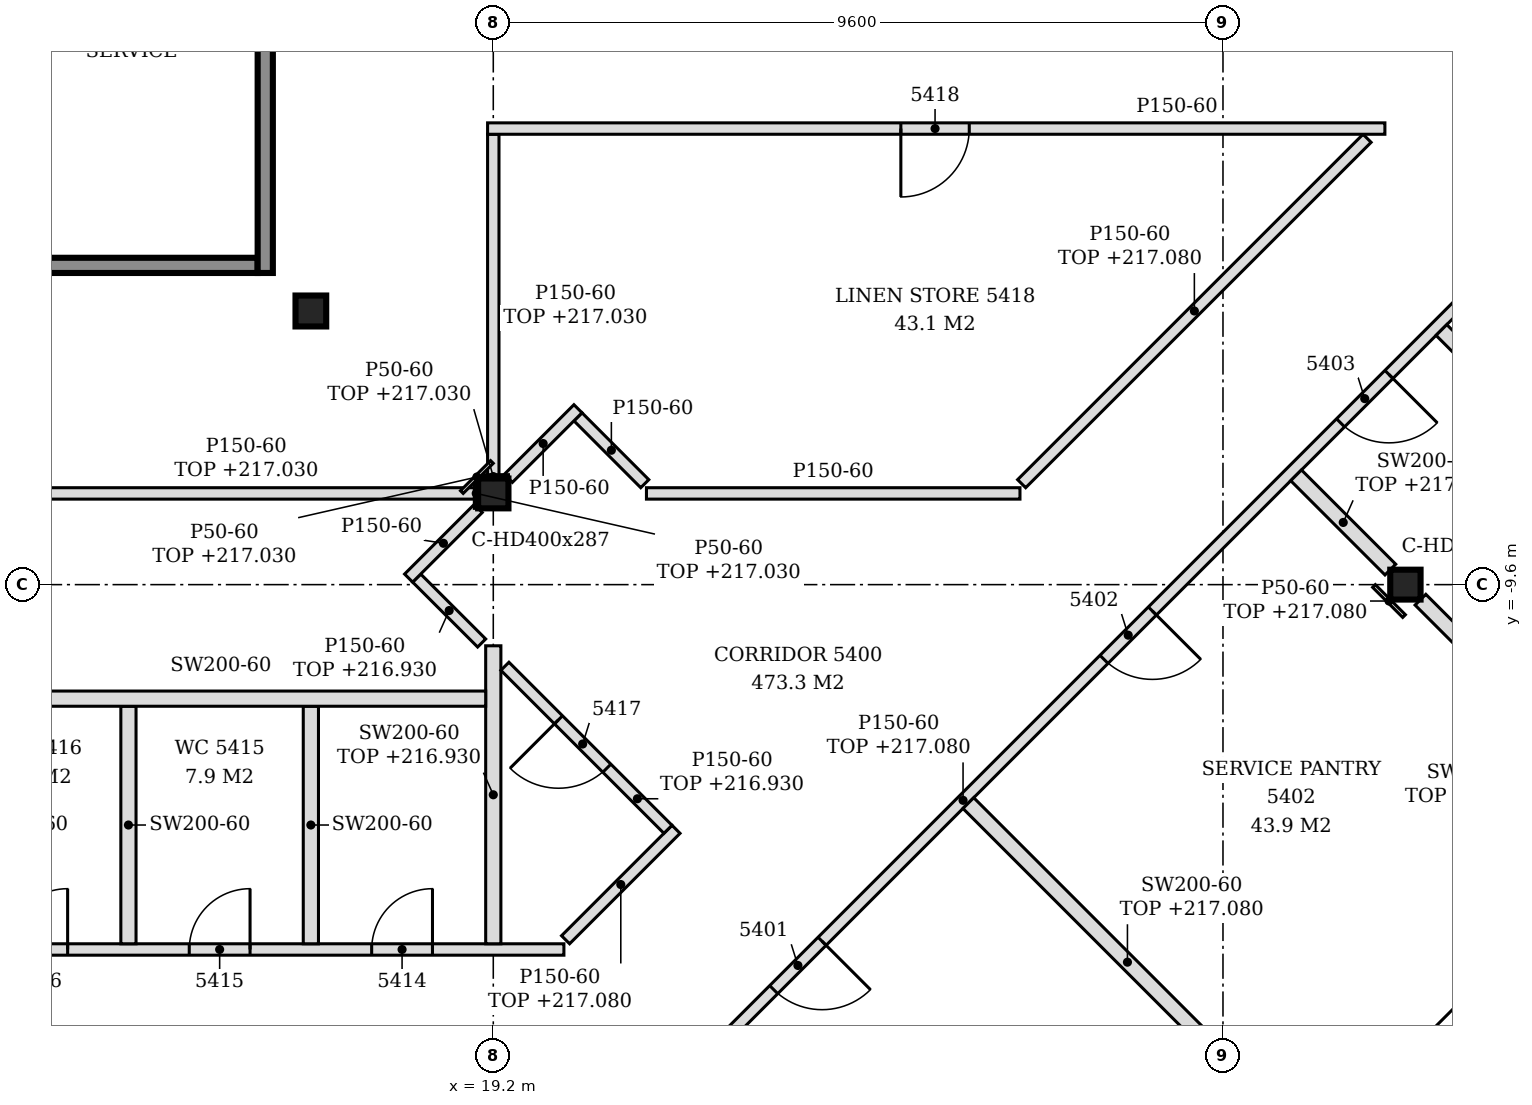
"""IFC4 building model, lengths in metres.
Left out: names, types, materials, properties, quantities, classifications, styles, units other than length and angle.
Written with IfcOpenShell. Run it as: python <this file> out.ifc"""

import sys

from ifc_helpers import new_model, si_unit, direction, frame, frame_2d, origin, origin_2d, place, context, subcontext, project, spatial, polyline, rectangle, i_section, outline, extrude, element, fill, save


model = new_model("IFC4")
c1 = context("Model", 3, precision=1e-05, world=origin(), true_north=direction((0.0, 1.0)))
c2 = subcontext(c1, "Body", "Model", "MODEL_VIEW")
j1 = project(units=[si_unit("LENGTHUNIT", "METRE"), si_unit("PLANEANGLEUNIT", "RADIAN")], contexts=[c1])
p1 = place(None, origin())
s1 = spatial("IfcSite", under=j1, at=p1, CompositionType="ELEMENT")
p2 = place(p1, origin())
s2 = spatial("IfcBuilding", under=s1, at=p2, CompositionType="ELEMENT")
p3 = place(p2, frame((0.0, 0.0, 214.2)))
s3 = spatial("IfcBuildingStorey", under=s2, at=p3, CompositionType="ELEMENT", Elevation=214.2)
p4 = place(p3, frame((19.2, -8.4, -0.15), z_axis=(0.0, 0.0, 1.0), x_axis=(1.0, 0.0, 0.0)))
e1 = element("IfcColumn", 1, at=p4, inside=s3, PredefinedType="COLUMN", context=c2, shape_type="SweptSolid", body=[
    extrude(i_section(OverallWidth=0.399, OverallDepth=0.393, WebThickness=0.023, FlangeThickness=0.037, FilletRadius=0.015, at=origin_2d()), origin(), (0.0, 0.0, 1.0), 3.6),
])
p5 = place(p3, frame((16.8, -6.0, -0.15), z_axis=(0.0, 0.0, 1.0), x_axis=(1.0, 0.0, 0.0)))
e2 = element("IfcColumn", 2, at=p5, inside=s3, PredefinedType="COLUMN", context=c2, shape_type="SweptSolid", body=[
    extrude(i_section(OverallWidth=0.404, OverallDepth=0.407, WebThickness=0.027, FlangeThickness=0.044, FilletRadius=0.015, at=origin_2d()), origin(), (0.0, 0.0, 1.0), 3.6),
])
p6 = place(p3, frame((31.2, -9.6, -0.15), z_axis=(0.0, 0.0, 1.0), x_axis=(1.0, 0.0, 0.0)))
e3 = element("IfcColumn", 3, at=p6, inside=s3, PredefinedType="COLUMN", context=c2, shape_type="SweptSolid", body=[
    extrude(i_section(OverallWidth=0.399, OverallDepth=0.393, WebThickness=0.023, FlangeThickness=0.037, FilletRadius=0.015, at=origin_2d()), origin(), (0.0, 0.0, 1.0), 3.6),
])
p7 = place(p3, frame((12.7, -5.4, 0.0), z_axis=(0.0, 0.0, 1.0), x_axis=(1.0, 0.0, 0.0)))
e4 = element("IfcWall", 4, at=p7, inside=s3, PredefinedType="SOLIDWALL", context=c2, shape_type="SweptSolid", body=[
    extrude(rectangle(XDim=3.4, YDim=0.2, at=frame_2d((1.7, 0.0))), origin(), (0.0, 0.0, 1.0), 3.45),
])
p8 = place(p3, frame((16.2, -5.5, 0.0), z_axis=(0.0, 0.0, 1.0), x_axis=(0.0, 1.0, 0.0)))
e5 = element("IfcWall", 5, at=p8, inside=s3, PredefinedType="SOLIDWALL", context=c2, shape_type="SweptSolid", body=[
    extrude(rectangle(XDim=15.8, YDim=0.2, at=frame_2d((7.9, 0.0))), origin(), (0.0, 0.0, 1.0), 3.45),
])
p9 = place(p8, frame((3.05, 0.0, 0.0)))
e6 = element("IfcOpeningElement", 6, at=p9, cuts=e5, PredefinedType="OPENING", context=c2, shape_type="SweptSolid", body=[
    extrude(rectangle(XDim=1.3, YDim=2.1, at=frame_2d((0.65, 1.05))), frame((0.0, 0.11, 0.0), z_axis=(0.0, -1.0, 0.0), x_axis=(1.0, 0.0, 0.0)), (0.0, 0.0, 1.0), 0.22),
])
p10 = place(p8, frame((11.45, 0.0, 0.0)))
e7 = element("IfcOpeningElement", 7, at=p10, cuts=e5, PredefinedType="OPENING", context=c2, shape_type="SweptSolid", body=[
    extrude(rectangle(XDim=1.3, YDim=2.1, at=frame_2d((0.65, 1.05))), frame((0.0, 0.11, 0.0), z_axis=(0.0, -1.0, 0.0), x_axis=(1.0, 0.0, 0.0)), (0.0, 0.0, 1.0), 0.22),
])
p11 = place(p3, frame((21.146, -16.672, 0.0), z_axis=(0.0, 0.0, 1.0), x_axis=(0.707100999376, 0.70711256295, 0.0)))
e8 = element("IfcWall", 8, at=p11, inside=s3, PredefinedType="PARTITIONING", context=c2, shape_type="SweptSolid", body=[
    extrude(rectangle(XDim=21.113, YDim=0.15, at=frame_2d((10.556, 0.0))), origin(), (0.0, 0.0, 1.0), 2.88),
])
p12 = place(p11, frame((2.466, 0.0, 0.0)))
e9 = element("IfcOpeningElement", 9, at=p12, cuts=e8, PredefinedType="OPENING", context=c2, shape_type="SweptSolid", body=[
    extrude(rectangle(XDim=0.9, YDim=2.1, at=frame_2d((0.45, 1.05))), frame((0.0, 0.085, 0.0), z_axis=(0.0, -1.0, 0.0), x_axis=(1.0, 0.0, 0.0)), (0.0, 0.0, 1.0), 0.17),
])
p13 = place(p11, frame((8.611, 0.0, 0.0)))
e10 = element("IfcOpeningElement", 10, at=p13, cuts=e8, PredefinedType="OPENING", context=c2, shape_type="SweptSolid", body=[
    extrude(rectangle(XDim=0.9, YDim=2.1, at=frame_2d((0.45, 1.05))), frame((0.0, 0.085, 0.0), z_axis=(0.0, -1.0, 0.0), x_axis=(1.0, 0.0, 0.0)), (0.0, 0.0, 1.0), 0.17),
])
p14 = place(p11, frame((13.012, 0.0, 0.0)))
e11 = element("IfcOpeningElement", 11, at=p14, cuts=e8, PredefinedType="OPENING", context=c2, shape_type="SweptSolid", body=[
    extrude(rectangle(XDim=0.9, YDim=2.1, at=frame_2d((0.45, 1.05))), frame((0.0, 0.085, 0.0), z_axis=(0.0, -1.0, 0.0), x_axis=(1.0, 0.0, 0.0)), (0.0, 0.0, 1.0), 0.17),
])
p15 = place(p11, frame((16.261, 0.0, 0.0)))
e12 = element("IfcOpeningElement", 12, at=p15, cuts=e8, PredefinedType="OPENING", context=c2, shape_type="SweptSolid", body=[
    extrude(rectangle(XDim=0.9, YDim=2.1, at=frame_2d((0.45, 1.05))), frame((0.0, 0.085, 0.0), z_axis=(0.0, -1.0, 0.0), x_axis=(1.0, 0.0, 0.0)), (0.0, 0.0, 1.0), 0.17),
])
p16 = place(p3, frame((29.636, -16.66, 0.0), z_axis=(0.0, 0.0, 1.0), x_axis=(-0.707106781187, 0.707106781187, 0.0)))
e13 = element("IfcWall", 13, at=p16, inside=s3, PredefinedType="PARTITIONING", context=c2, shape_type="SweptSolid", body=[
    extrude(rectangle(XDim=5.92, YDim=0.2, at=frame_2d((2.96, 0.0))), origin(), (0.0, 0.0, 1.0), 2.88),
])
p17 = place(p3, frame((2.325, -14.4, 0.0), z_axis=(0.0, 0.0, 1.0), x_axis=(1.0, 0.0, 0.0)))
e14 = element("IfcWall", 14, at=p17, inside=s3, PredefinedType="PARTITIONING", context=c2, shape_type="SweptSolid", body=[
    extrude(outline(polyline([(0.0, 0.0), (17.804, 0.0), (17.804, 2.88), (17.025, 2.88), (17.023, 2.73), (16.725, 2.73), (16.723, 2.88), (5.025, 2.88), (5.023, 2.73), (4.725, 2.73), (4.723, 2.88), (0.0, 2.88), (0.0, 0.0)])), frame((0.0, 0.075, 0.0), z_axis=(0.0, -1.0, 0.0), x_axis=(1.0, 0.0, 0.0)), (0.0, 0.0, 1.0), 0.15),
])
p18 = place(p17, frame((15.275, 0.0, 0.0)))
e15 = element("IfcOpeningElement", 15, at=p18, cuts=e14, PredefinedType="OPENING", context=c2, shape_type="SweptSolid", body=[
    extrude(rectangle(XDim=0.8, YDim=2.1, at=frame_2d((0.4, 1.05))), frame((0.0, 0.085, 0.0), z_axis=(0.0, -1.0, 0.0), x_axis=(1.0, 0.0, 0.0)), (0.0, 0.0, 1.0), 0.17),
])
p19 = place(p17, frame((12.875, 0.0, 0.0)))
e16 = element("IfcOpeningElement", 16, at=p19, cuts=e14, PredefinedType="OPENING", context=c2, shape_type="SweptSolid", body=[
    extrude(rectangle(XDim=0.8, YDim=2.1, at=frame_2d((0.4, 1.05))), frame((0.0, 0.085, 0.0), z_axis=(0.0, -1.0, 0.0), x_axis=(1.0, 0.0, 0.0)), (0.0, 0.0, 1.0), 0.17),
])
p20 = place(p17, frame((10.475, 0.0, 0.0)))
e17 = element("IfcOpeningElement", 17, at=p20, cuts=e14, PredefinedType="OPENING", context=c2, shape_type="SweptSolid", body=[
    extrude(rectangle(XDim=0.8, YDim=2.1, at=frame_2d((0.4, 1.05))), frame((0.0, 0.085, 0.0), z_axis=(0.0, -1.0, 0.0), x_axis=(1.0, 0.0, 0.0)), (0.0, 0.0, 1.0), 0.17),
])
for number, where, z_axis, x_axis in (
    (18, (14.4, -14.325, 0.0), (0.0, 0.0, 1.0), (0.0, 1.0, 0.0)),
    (19, (16.8, -14.325, 0.0), (0.0, 0.0, 1.0), (0.0, 1.0, 0.0)),
):
    element("IfcWall", number, at=place(p3, frame(where, z_axis=z_axis, x_axis=x_axis)), inside=s3, PredefinedType="PARTITIONING", context=c2, shape_type="SweptSolid", body=[
        extrude(outline(polyline([(0.0, 0.0), (3.125, 0.0), (3.125, 3.45), (0.03, 3.45), (0.028, 2.88), (0.0, 2.88), (0.0, 0.0)])), frame((0.0, 0.1, 0.0), z_axis=(0.0, -1.0, 0.0), x_axis=(1.0, 0.0, 0.0)), (0.0, 0.0, 1.0), 0.2),
    ])
p21 = place(p3, frame((19.2, -14.325, 0.0), z_axis=(0.0, 0.0, 1.0), x_axis=(0.0, 1.0, 0.0)))
e20 = element("IfcWall", 20, at=p21, inside=s3, PredefinedType="PARTITIONING", context=c2, shape_type="SweptSolid", body=[
    extrude(rectangle(XDim=3.92, YDim=0.2, at=frame_2d((1.96, 0.0))), origin(), (0.0, 0.0, 1.0), 2.73),
])
p22 = place(p3, frame((20.151, -14.272, 0.0), z_axis=(0.0, 0.0, 1.0), x_axis=(0.707106781187, 0.707106781187, 0.0)))
e21 = element("IfcWall", 21, at=p22, inside=s3, PredefinedType="PARTITIONING", context=c2, shape_type="SweptSolid", body=[
    extrude(rectangle(XDim=2.055, YDim=0.15, at=frame_2d((1.027, 0.0))), origin(), (0.0, 0.0, 1.0), 2.88),
])
p23 = place(p3, frame((34.581, -12.981, 0.0), z_axis=(0.0, 0.0, 1.0), x_axis=(-0.707133900936, 0.707079660397, 0.0)))
e22 = element("IfcWall", 22, at=p23, inside=s3, PredefinedType="PARTITIONING", context=c2, shape_type="SweptSolid", body=[
    extrude(rectangle(XDim=4.501, YDim=0.2, at=frame_2d((2.25, 0.0))), origin(), (0.0, 0.0, 1.0), 2.63),
])
p24 = place(p3, frame((21.498, -12.819, 0.0), z_axis=(0.0, 0.0, 1.0), x_axis=(-0.707106781187, 0.707106781187, 0.0)))
e23 = element("IfcWall", 23, at=p24, inside=s3, PredefinedType="PARTITIONING", context=c2, shape_type="SweptSolid", body=[
    extrude(rectangle(XDim=3.033, YDim=0.15, at=frame_2d((1.517, 0.0))), origin(), (0.0, 0.0, 1.0), 2.73),
])
p25 = place(p24, frame((1.137, 0.0, 0.0)))
e24 = element("IfcOpeningElement", 24, at=p25, cuts=e23, PredefinedType="OPENING", context=c2, shape_type="SweptSolid", body=[
    extrude(rectangle(XDim=0.9, YDim=2.1, at=frame_2d((0.45, 1.05))), frame((0.0, 0.085, 0.0), z_axis=(0.0, -1.0, 0.0), x_axis=(1.0, 0.0, 0.0)), (0.0, 0.0, 1.0), 0.17),
])
p26 = place(p3, frame((11.9, -11.1, 0.0), z_axis=(0.0, 0.0, 1.0), x_axis=(1.0, 0.0, 0.0)))
e25 = element("IfcWall", 25, at=p26, inside=s3, PredefinedType="PARTITIONING", context=c2, shape_type="SweptSolid", body=[
    extrude(outline(polyline([(0.0, 0.0), (7.2, 0.0), (7.2, 2.73), (7.15, 2.73), (7.148, 3.45), (0.0, 3.45), (0.0, 0.0)])), frame((0.0, 0.1, 0.0), z_axis=(0.0, -1.0, 0.0), x_axis=(1.0, 0.0, 0.0)), (0.0, 0.0, 1.0), 0.2),
])
p27 = place(p3, frame((19.047, -10.368, 0.0), z_axis=(0.0, 0.0, 1.0), x_axis=(-0.707409718716, 0.706803713817, 0.0)))
e26 = element("IfcWall", 26, at=p27, inside=s3, PredefinedType="PARTITIONING", context=c2, shape_type="SweptSolid", body=[
    extrude(rectangle(XDim=1.208, YDim=0.15, at=frame_2d((0.604, 0.0))), origin(), (0.0, 0.0, 1.0), 2.73),
])
p28 = place(p3, frame((35.86, -10.436, 0.0), z_axis=(0.0, 0.0, 1.0), x_axis=(-0.707106781187, 0.707106781187, 0.0)))
e27 = element("IfcWall", 27, at=p28, inside=s3, PredefinedType="PARTITIONING", context=c2, shape_type="SweptSolid", body=[
    extrude(rectangle(XDim=5.92, YDim=0.2, at=frame_2d((2.96, 0.0))), origin(), (0.0, 0.0, 1.0), 3.07),
])
p29 = place(p3, frame((18.086, -9.514, 0.0), z_axis=(0.0, 0.0, 1.0), x_axis=(0.707106781187, 0.707106781187, 0.0)))
e28 = element("IfcWall", 28, at=p29, inside=s3, PredefinedType="PARTITIONING", context=c2, shape_type="SweptSolid", body=[
    extrude(rectangle(XDim=1.295, YDim=0.15, at=frame_2d((0.648, 0.0))), origin(), (0.0, 0.0, 1.0), 3.45),
])
p30 = place(p3, frame((31.002, -9.402, 0.0), z_axis=(0.0, 0.0, 1.0), x_axis=(-0.707106781187, 0.707106781187, 0.0)))
e29 = element("IfcWall", 29, at=p30, inside=s3, PredefinedType="PARTITIONING", context=c2, shape_type="SweptSolid", body=[
    extrude(rectangle(XDim=1.754, YDim=0.2, at=frame_2d((0.877, 0.0))), origin(), (0.0, 0.0, 1.0), 2.93),
])
p31 = place(p3, frame((7.399, -8.4, 0.0), z_axis=(0.0, 0.0, 1.0), x_axis=(1.0, 0.0, 0.0)))
e30 = element("IfcWall", 30, at=p31, inside=s3, PredefinedType="PARTITIONING", context=c2, shape_type="SweptSolid", body=[
    extrude(rectangle(XDim=11.601, YDim=0.15, at=frame_2d((5.801, 0.0))), origin(), (0.0, 0.0, 1.0), 2.83),
])
p32 = place(p31, frame((4.601, 0.0, 0.0)))
e31 = element("IfcOpeningElement", 31, at=p32, cuts=e30, PredefinedType="OPENING", context=c2, shape_type="SweptSolid", body=[
    extrude(rectangle(XDim=0.9, YDim=2.1, at=frame_2d((0.45, 1.05))), frame((0.0, 0.085, 0.0), z_axis=(0.0, -1.0, 0.0), x_axis=(1.0, 0.0, 0.0)), (0.0, 0.0, 1.0), 0.17),
])
p33 = place(p3, frame((21.215, -8.4, 0.0), z_axis=(0.0, 0.0, 1.0), x_axis=(1.0, 0.0, 0.0)))
e32 = element("IfcWall", 32, at=p33, inside=s3, PredefinedType="PARTITIONING", context=c2, shape_type="SweptSolid", body=[
    extrude(rectangle(XDim=4.914, YDim=0.15, at=frame_2d((2.457, 0.0))), origin(), (0.0, 0.0, 1.0), 3.45),
])
p34 = place(p3, frame((21.193, -8.272, 0.0), z_axis=(0.0, 0.0, 1.0), x_axis=(-0.706812296552, 0.70740114323, 0.0)))
e33 = element("IfcWall", 33, at=p34, inside=s3, PredefinedType="PARTITIONING", context=c2, shape_type="SweptSolid", body=[
    extrude(rectangle(XDim=1.244, YDim=0.15, at=frame_2d((0.622, 0.0))), origin(), (0.0, 0.0, 1.0), 3.45),
])
p35 = place(p3, frame((26.151, -8.272, 0.0), z_axis=(0.0, 0.0, 1.0), x_axis=(0.707163762272, 0.707049795509, 0.0)))
e34 = element("IfcWall", 34, at=p35, inside=s3, PredefinedType="PARTITIONING", context=c2, shape_type="SweptSolid", body=[
    extrude(rectangle(XDim=6.427, YDim=0.15, at=frame_2d((3.213, 0.0))), origin(), (0.0, 0.0, 1.0), 2.88),
])
p36 = place(p3, frame((19.2, -8.204, 0.0), z_axis=(0.0, 0.0, 1.0), x_axis=(0.0, 1.0, 0.0)))
e35 = element("IfcWall", 35, at=p36, inside=s3, PredefinedType="PARTITIONING", context=c2, shape_type="SweptSolid", body=[
    extrude(rectangle(XDim=4.529, YDim=0.15, at=frame_2d((2.264, 0.0))), origin(), (0.0, 0.0, 1.0), 2.83),
])
p37 = place(p3, frame((19.398, -8.202, 0.0), z_axis=(0.0, 0.0, 1.0), x_axis=(0.707200993001, 0.707012556818, 0.0)))
e36 = element("IfcWall", 36, at=p37, inside=s3, PredefinedType="PARTITIONING", context=c2, shape_type="SweptSolid", body=[
    extrude(rectangle(XDim=1.296, YDim=0.15, at=frame_2d((0.648, 0.0))), origin(), (0.0, 0.0, 1.0), 3.45),
])
p38 = place(p3, frame((19.125, -3.6, 0.0), z_axis=(0.0, 0.0, 1.0), x_axis=(1.0, 0.0, 0.0)))
e37 = element("IfcWall", 37, at=p38, inside=s3, PredefinedType="PARTITIONING", context=c2, shape_type="SweptSolid", body=[
    extrude(outline(polyline([(0.0, 0.0), (11.805, 0.0), (11.805, 3.45), (0.225, 3.45), (0.223, 2.83), (0.0, 2.83), (0.0, 0.0)])), frame((0.0, 0.075, 0.0), z_axis=(0.0, -1.0, 0.0), x_axis=(1.0, 0.0, 0.0)), (0.0, 0.0, 1.0), 0.15),
])
p39 = place(p38, frame((5.437, 0.0, 0.0)))
e38 = element("IfcOpeningElement", 38, at=p39, cuts=e37, PredefinedType="OPENING", context=c2, shape_type="SweptSolid", body=[
    extrude(rectangle(XDim=0.9, YDim=2.1, at=frame_2d((0.45, 1.05))), frame((0.0, 0.085, 0.0), z_axis=(0.0, -1.0, 0.0), x_axis=(1.0, 0.0, 0.0)), (0.0, 0.0, 1.0), 0.17),
])
p40 = place(p3, frame((31.182, -10.014, 0.0), z_axis=(0.0, 0.0, 1.0), x_axis=(-0.707106781187, 0.707106781187, 0.0)))
e39 = element("IfcWall", 39, at=p40, inside=s3, PredefinedType="PARTITIONING", context=c2, shape_type="SweptSolid", body=[
    extrude(rectangle(XDim=0.56, YDim=0.05, at=frame_2d((0.28, 0.0))), origin(), (0.0, 0.0, 1.0), 2.88),
])
p41 = place(p3, frame((18.786, -8.382, 0.0), z_axis=(0.0, 0.0, 1.0), x_axis=(0.707106781187, 0.707106781187, 0.0)))
e40 = element("IfcWall", 40, at=p41, inside=s3, PredefinedType="PARTITIONING", context=c2, shape_type="SweptSolid", body=[
    extrude(rectangle(XDim=0.56, YDim=0.05, at=frame_2d((0.28, 0.0))), origin(), (0.0, 0.0, 1.0), 2.83),
])
p42 = place(p3, frame((19.0, -8.178, 0.0), z_axis=(0.0, 0.0, 1.0), x_axis=(1.0, 0.0, 0.0)))
e41 = element("IfcWall", 41, at=p42, inside=s3, PredefinedType="PARTITIONING", context=c2, shape_type="SweptSolid", body=[
    extrude(rectangle(XDim=0.399, YDim=0.05, at=frame_2d((0.199, 0.0))), origin(), (0.0, 0.0, 1.0), 2.83),
])
p43 = place(p3, frame((18.976, -8.596, 0.0), z_axis=(0.0, 0.0, 1.0), x_axis=(0.0, 1.0, 0.0)))
e42 = element("IfcWall", 42, at=p43, inside=s3, PredefinedType="PARTITIONING", context=c2, shape_type="SweptSolid", body=[
    extrude(rectangle(XDim=0.393, YDim=0.05, at=frame_2d((0.196, 0.0))), origin(), (0.0, 0.0, 1.0), 2.83),
])
p44 = place(p12, frame((0.9, 0.0, 0.0), z_axis=(0.0, 0.0, 1.0), x_axis=(-1.0, 0.0, 0.0)))
e43 = element("IfcDoor", 43, at=p44, inside=s3, OperationType="SINGLE_SWING_LEFT", PredefinedType="DOOR", context=c2, shape_type="SweptSolid", body=[
    extrude(rectangle(XDim=0.9, YDim=2.1, at=frame_2d((0.45, 1.05))), frame((0.0, 0.025, 0.0), z_axis=(0.0, -1.0, 0.0), x_axis=(1.0, 0.0, 0.0)), (0.0, 0.0, 1.0), 0.05),
])
fill(e9, e43)
p45 = place(p13, frame((0.9, 0.0, 0.0), z_axis=(0.0, 0.0, 1.0), x_axis=(-1.0, 0.0, 0.0)))
e44 = element("IfcDoor", 44, at=p45, inside=s3, OperationType="SINGLE_SWING_LEFT", PredefinedType="DOOR", context=c2, shape_type="SweptSolid", body=[
    extrude(rectangle(XDim=0.9, YDim=2.1, at=frame_2d((0.45, 1.05))), frame((0.0, 0.025, 0.0), z_axis=(0.0, -1.0, 0.0), x_axis=(1.0, 0.0, 0.0)), (0.0, 0.0, 1.0), 0.05),
])
fill(e10, e44)
p46 = place(p14, frame((0.9, 0.0, 0.0), z_axis=(0.0, 0.0, 1.0), x_axis=(-1.0, 0.0, 0.0)))
e45 = element("IfcDoor", 45, at=p46, inside=s3, OperationType="SINGLE_SWING_LEFT", PredefinedType="DOOR", context=c2, shape_type="SweptSolid", body=[
    extrude(rectangle(XDim=0.9, YDim=2.1, at=frame_2d((0.45, 1.05))), frame((0.0, 0.025, 0.0), z_axis=(0.0, -1.0, 0.0), x_axis=(1.0, 0.0, 0.0)), (0.0, 0.0, 1.0), 0.05),
])
fill(e11, e45)
p47 = place(p18, origin())
e46 = element("IfcDoor", 46, at=p47, inside=s3, OperationType="SINGLE_SWING_RIGHT", PredefinedType="DOOR", context=c2, shape_type="SweptSolid", body=[
    extrude(rectangle(XDim=0.8, YDim=2.1, at=frame_2d((0.4, 1.05))), frame((0.0, 0.025, 0.0), z_axis=(0.0, -1.0, 0.0), x_axis=(1.0, 0.0, 0.0)), (0.0, 0.0, 1.0), 0.05),
])
fill(e15, e46)
p48 = place(p19, origin())
e47 = element("IfcDoor", 47, at=p48, inside=s3, OperationType="SINGLE_SWING_RIGHT", PredefinedType="DOOR", context=c2, shape_type="SweptSolid", body=[
    extrude(rectangle(XDim=0.8, YDim=2.1, at=frame_2d((0.4, 1.05))), frame((0.0, 0.025, 0.0), z_axis=(0.0, -1.0, 0.0), x_axis=(1.0, 0.0, 0.0)), (0.0, 0.0, 1.0), 0.05),
])
fill(e16, e47)
p49 = place(p20, origin())
e48 = element("IfcDoor", 48, at=p49, inside=s3, OperationType="SINGLE_SWING_RIGHT", PredefinedType="DOOR", context=c2, shape_type="SweptSolid", body=[
    extrude(rectangle(XDim=0.8, YDim=2.1, at=frame_2d((0.4, 1.05))), frame((0.0, 0.025, 0.0), z_axis=(0.0, -1.0, 0.0), x_axis=(1.0, 0.0, 0.0)), (0.0, 0.0, 1.0), 0.05),
])
fill(e17, e48)
p50 = place(p25, origin())
e49 = element("IfcDoor", 49, at=p50, inside=s3, OperationType="SINGLE_SWING_RIGHT", PredefinedType="DOOR", context=c2, shape_type="SweptSolid", body=[
    extrude(rectangle(XDim=0.9, YDim=2.1, at=frame_2d((0.45, 1.05))), frame((0.0, 0.025, 0.0), z_axis=(0.0, -1.0, 0.0), x_axis=(1.0, 0.0, 0.0)), (0.0, 0.0, 1.0), 0.05),
])
fill(e24, e49)
p51 = place(p39, frame((0.9, 0.0, 0.0), z_axis=(0.0, 0.0, 1.0), x_axis=(-1.0, 0.0, 0.0)))
e50 = element("IfcDoor", 50, at=p51, inside=s3, OperationType="SINGLE_SWING_RIGHT", PredefinedType="DOOR", context=c2, shape_type="SweptSolid", body=[
    extrude(rectangle(XDim=0.9, YDim=2.1, at=frame_2d((0.45, 1.05))), frame((0.0, 0.025, 0.0), z_axis=(0.0, -1.0, 0.0), x_axis=(1.0, 0.0, 0.0)), (0.0, 0.0, 1.0), 0.05),
])
fill(e38, e50)
save(model, sys.argv[1])
